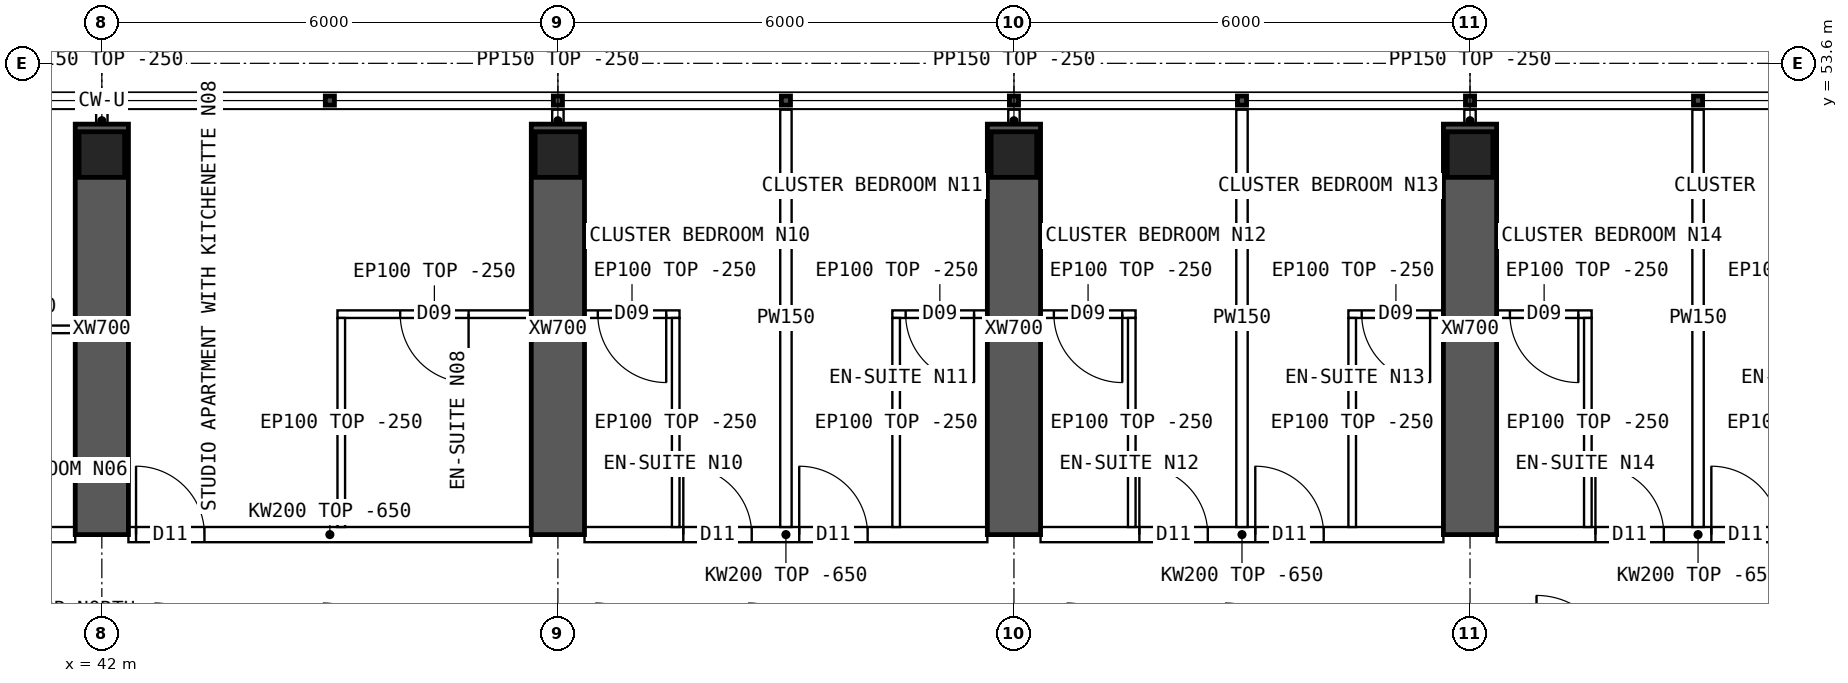
"""IFC4 building model, lengths in metres.
Left out: names, types, materials, properties, quantities, classifications, styles, units other than length and angle.
Written with IfcOpenShell. Run it as: python <this file> out.ifc"""

import sys

from ifc_helpers import new_model, si_unit, direction, frame, frame_2d, origin, origin_2d, place, context, subcontext, project, spatial, polyline, rectangle, hollow_rectangle, outline, extrude, element, fill, save


model = new_model("IFC4")
c1 = context("Model", 3, precision=1e-05, world=origin(), true_north=direction((0.0, 1.0)))
c2 = subcontext(c1, "Body", "Model", "MODEL_VIEW")
j1 = project(units=[si_unit("LENGTHUNIT", "METRE"), si_unit("PLANEANGLEUNIT", "RADIAN")], contexts=[c1])
p1 = place(None, origin())
s1 = spatial("IfcSite", under=j1, at=p1, CompositionType="ELEMENT")
p2 = place(p1, origin())
s2 = spatial("IfcBuilding", under=s1, at=p2, CompositionType="ELEMENT")
p3 = place(p2, frame((0.0, 0.0, 235.3)))
s3 = spatial("IfcBuildingStorey", under=s2, at=p3, CompositionType="ELEMENT", Elevation=235.3)
for number, where, z_axis, x_axis in (
    (1, (42.0, 52.4, 0.0), (0.0, 0.0, 1.0), (1.0, 0.0, 0.0)),
    (2, (48.0, 52.4, 0.0), (0.0, 0.0, 1.0), (1.0, 0.0, 0.0)),
    (3, (54.0, 52.4, 0.0), (0.0, 0.0, 1.0), (1.0, 0.0, 0.0)),
    (4, (60.0, 52.4, 0.0), (0.0, 0.0, 1.0), (1.0, 0.0, 0.0)),
):
    element("IfcColumn", number, at=place(p3, frame(where, z_axis=z_axis, x_axis=x_axis)), inside=s3, PredefinedType="COLUMN", context=c2, shape_type="SweptSolid", body=[
        extrude(hollow_rectangle(XDim=0.6, YDim=0.6, WallThickness=0.06, at=origin_2d()), origin(), (0.0, 0.0, 1.0), 3.75),
    ])
for number, where, z_axis, x_axis in (
    (5, (42.0, 47.4, 0.0), (0.0, 0.0, 1.0), (0.0, 1.0, 0.0)),
    (6, (48.0, 47.4, 0.0), (0.0, 0.0, 1.0), (0.0, 1.0, 0.0)),
    (7, (54.0, 47.4, 0.0), (0.0, 0.0, 1.0), (0.0, 1.0, 0.0)),
    (8, (60.0, 47.4, 0.0), (0.0, 0.0, 1.0), (0.0, 1.0, 0.0)),
):
    element("IfcWall", number, at=place(p3, frame(where, z_axis=z_axis, x_axis=x_axis)), inside=s3, PredefinedType="SHEAR", context=c2, shape_type="SweptSolid", body=[
        extrude(rectangle(XDim=5.4, YDim=0.7, at=frame_2d((2.7, 0.0))), origin(), (0.0, 0.0, 1.0), 3.75),
    ])
p4 = place(p3, frame((36.35, 47.4, 0.0), z_axis=(0.0, 0.0, 1.0), x_axis=(1.0, 0.0, 0.0)))
e9 = element("IfcWall", 9, at=p4, inside=s3, PredefinedType="SOLIDWALL", context=c2, shape_type="SweptSolid", body=[
    extrude(outline(polyline([(0.0, 0.0), (5.3, 0.0), (5.3, 3.1), (0.0, 3.1), (0.0, 0.0)])), frame((0.0, 0.1, 0.0), z_axis=(0.0, -1.0, 0.0), x_axis=(1.0, 0.0, 0.0)), (0.0, 0.0, 1.0), 0.2),
])
p5 = place(p4, frame((0.3, 0.0, 0.0)))
e10 = element("IfcOpeningElement", 10, at=p5, cuts=e9, PredefinedType="OPENING", context=c2, shape_type="SweptSolid", body=[
    extrude(rectangle(XDim=1.0, YDim=2.1, at=frame_2d((0.5, 1.05))), frame((0.0, 0.11, 0.0), z_axis=(0.0, -1.0, 0.0), x_axis=(1.0, 0.0, 0.0)), (0.0, 0.0, 1.0), 0.22),
])
p6 = place(p3, frame((42.35, 47.4, 0.0), z_axis=(0.0, 0.0, 1.0), x_axis=(1.0, 0.0, 0.0)))
e11 = element("IfcWall", 11, at=p6, inside=s3, PredefinedType="SOLIDWALL", context=c2, shape_type="SweptSolid", body=[
    extrude(outline(polyline([(0.0, 0.0), (5.3, 0.0), (5.3, 3.1), (0.0, 3.1), (0.0, 0.0)])), frame((0.0, 0.1, 0.0), z_axis=(0.0, -1.0, 0.0), x_axis=(1.0, 0.0, 0.0)), (0.0, 0.0, 1.0), 0.2),
])
p7 = place(p6, frame((0.1, 0.0, 0.0)))
e12 = element("IfcOpeningElement", 12, at=p7, cuts=e11, PredefinedType="OPENING", context=c2, shape_type="SweptSolid", body=[
    extrude(rectangle(XDim=0.9, YDim=2.1, at=frame_2d((0.45, 1.05))), frame((0.0, 0.11, 0.0), z_axis=(0.0, -1.0, 0.0), x_axis=(1.0, 0.0, 0.0)), (0.0, 0.0, 1.0), 0.22),
])
p8 = place(p3, frame((48.35, 47.4, 0.0), z_axis=(0.0, 0.0, 1.0), x_axis=(1.0, 0.0, 0.0)))
e13 = element("IfcWall", 13, at=p8, inside=s3, PredefinedType="SOLIDWALL", context=c2, shape_type="SweptSolid", body=[
    extrude(outline(polyline([(0.0, 0.0), (5.3, 0.0), (5.3, 3.1), (0.0, 3.1), (0.0, 0.0)])), frame((0.0, 0.1, 0.0), z_axis=(0.0, -1.0, 0.0), x_axis=(1.0, 0.0, 0.0)), (0.0, 0.0, 1.0), 0.2),
])
p9 = place(p8, frame((1.3, 0.0, 0.0)))
e14 = element("IfcOpeningElement", 14, at=p9, cuts=e13, PredefinedType="OPENING", context=c2, shape_type="SweptSolid", body=[
    extrude(rectangle(XDim=0.9, YDim=2.1, at=frame_2d((0.45, 1.05))), frame((0.0, 0.11, 0.0), z_axis=(0.0, -1.0, 0.0), x_axis=(1.0, 0.0, 0.0)), (0.0, 0.0, 1.0), 0.22),
])
p10 = place(p8, frame((2.825, 0.0, 0.0)))
e15 = element("IfcOpeningElement", 15, at=p10, cuts=e13, PredefinedType="OPENING", context=c2, shape_type="SweptSolid", body=[
    extrude(rectangle(XDim=0.9, YDim=2.1, at=frame_2d((0.45, 1.05))), frame((0.0, 0.11, 0.0), z_axis=(0.0, -1.0, 0.0), x_axis=(1.0, 0.0, 0.0)), (0.0, 0.0, 1.0), 0.22),
])
p11 = place(p3, frame((54.35, 47.4, 0.0), z_axis=(0.0, 0.0, 1.0), x_axis=(1.0, 0.0, 0.0)))
e16 = element("IfcWall", 16, at=p11, inside=s3, PredefinedType="SOLIDWALL", context=c2, shape_type="SweptSolid", body=[
    extrude(outline(polyline([(0.0, 0.0), (5.3, 0.0), (5.3, 3.1), (0.0, 3.1), (0.0, 0.0)])), frame((0.0, 0.1, 0.0), z_axis=(0.0, -1.0, 0.0), x_axis=(1.0, 0.0, 0.0)), (0.0, 0.0, 1.0), 0.2),
])
p12 = place(p11, frame((1.3, 0.0, 0.0)))
e17 = element("IfcOpeningElement", 17, at=p12, cuts=e16, PredefinedType="OPENING", context=c2, shape_type="SweptSolid", body=[
    extrude(rectangle(XDim=0.9, YDim=2.1, at=frame_2d((0.45, 1.05))), frame((0.0, 0.11, 0.0), z_axis=(0.0, -1.0, 0.0), x_axis=(1.0, 0.0, 0.0)), (0.0, 0.0, 1.0), 0.22),
])
p13 = place(p11, frame((2.825, 0.0, 0.0)))
e18 = element("IfcOpeningElement", 18, at=p13, cuts=e16, PredefinedType="OPENING", context=c2, shape_type="SweptSolid", body=[
    extrude(rectangle(XDim=0.9, YDim=2.1, at=frame_2d((0.45, 1.05))), frame((0.0, 0.11, 0.0), z_axis=(0.0, -1.0, 0.0), x_axis=(1.0, 0.0, 0.0)), (0.0, 0.0, 1.0), 0.22),
])
p14 = place(p3, frame((60.35, 47.4, 0.0), z_axis=(0.0, 0.0, 1.0), x_axis=(1.0, 0.0, 0.0)))
e19 = element("IfcWall", 19, at=p14, inside=s3, PredefinedType="SOLIDWALL", context=c2, shape_type="SweptSolid", body=[
    extrude(outline(polyline([(0.0, 0.0), (5.3, 0.0), (5.3, 3.1), (0.0, 3.1), (0.0, 0.0)])), frame((0.0, 0.1, 0.0), z_axis=(0.0, -1.0, 0.0), x_axis=(1.0, 0.0, 0.0)), (0.0, 0.0, 1.0), 0.2),
])
p15 = place(p14, frame((1.3, 0.0, 0.0)))
e20 = element("IfcOpeningElement", 20, at=p15, cuts=e19, PredefinedType="OPENING", context=c2, shape_type="SweptSolid", body=[
    extrude(rectangle(XDim=0.9, YDim=2.1, at=frame_2d((0.45, 1.05))), frame((0.0, 0.11, 0.0), z_axis=(0.0, -1.0, 0.0), x_axis=(1.0, 0.0, 0.0)), (0.0, 0.0, 1.0), 0.22),
])
p16 = place(p14, frame((2.825, 0.0, 0.0)))
e21 = element("IfcOpeningElement", 21, at=p16, cuts=e19, PredefinedType="OPENING", context=c2, shape_type="SweptSolid", body=[
    extrude(rectangle(XDim=0.9, YDim=2.1, at=frame_2d((0.45, 1.05))), frame((0.0, 0.11, 0.0), z_axis=(0.0, -1.0, 0.0), x_axis=(1.0, 0.0, 0.0)), (0.0, 0.0, 1.0), 0.22),
])
p17 = place(p3, frame((39.0, 50.1, 0.0), z_axis=(0.0, 0.0, 1.0), x_axis=(1.0, 0.0, 0.0)))
e22 = element("IfcWall", 22, at=p17, inside=s3, PredefinedType="PARTITIONING", context=c2, shape_type="SweptSolid", body=[
    extrude(rectangle(XDim=2.65, YDim=0.1, at=frame_2d((1.325, 0.0))), origin(), (0.0, 0.0, 1.0), 3.5),
])
p18 = place(p3, frame((45.1, 50.3, 0.0), z_axis=(0.0, 0.0, 1.0), x_axis=(1.0, 0.0, 0.0)))
e23 = element("IfcWall", 23, at=p18, inside=s3, PredefinedType="PARTITIONING", context=c2, shape_type="SweptSolid", body=[
    extrude(rectangle(XDim=2.55, YDim=0.1, at=frame_2d((1.275, 0.0))), origin(), (0.0, 0.0, 1.0), 3.5),
])
p19 = place(p18, frame((0.825, 0.0, 0.0)))
e24 = element("IfcOpeningElement", 24, at=p19, cuts=e23, PredefinedType="OPENING", context=c2, shape_type="SweptSolid", body=[
    extrude(rectangle(XDim=0.9, YDim=2.1, at=frame_2d((0.45, 1.05))), frame((0.0, 0.06, 0.0), z_axis=(0.0, -1.0, 0.0), x_axis=(1.0, 0.0, 0.0)), (0.0, 0.0, 1.0), 0.12),
])
p20 = place(p3, frame((45.15, 50.25, 0.0), z_axis=(0.0, 0.0, 1.0), x_axis=(0.0, -1.0, 0.0)))
e25 = element("IfcWall", 25, at=p20, inside=s3, PredefinedType="PARTITIONING", context=c2, shape_type="SweptSolid", body=[
    extrude(outline(polyline([(0.0, 0.0), (2.75, 0.0), (2.75, 3.1), (2.702, 3.1), (2.7, 3.5), (0.0, 3.5), (0.0, 0.0)])), frame((0.0, 0.05, 0.0), z_axis=(0.0, -1.0, 0.0), x_axis=(1.0, 0.0, 0.0)), (0.0, 0.0, 1.0), 0.1),
])
p21 = place(p3, frame((51.0, 52.99, 0.0), z_axis=(0.0, 0.0, 1.0), x_axis=(0.0, -1.0, 0.0)))
e26 = element("IfcWall", 26, at=p21, inside=s3, PredefinedType="PARTITIONING", context=c2, shape_type="SweptSolid", body=[
    extrude(outline(polyline([(0.0, 0.0), (5.49, 0.0), (5.49, 3.1), (5.442, 3.1), (5.44, 3.5), (0.792, 3.5), (0.79, 3.1), (0.392, 3.1), (0.39, 3.5), (0.0, 3.5), (0.0, 0.0)])), frame((0.0, 0.075, 0.0), z_axis=(0.0, -1.0, 0.0), x_axis=(1.0, 0.0, 0.0)), (0.0, 0.0, 1.0), 0.15),
])
p22 = place(p3, frame((48.35, 50.3, 0.0), z_axis=(0.0, 0.0, 1.0), x_axis=(1.0, 0.0, 0.0)))
e27 = element("IfcWall", 27, at=p22, inside=s3, PredefinedType="PARTITIONING", context=c2, shape_type="SweptSolid", body=[
    extrude(rectangle(XDim=1.25, YDim=0.1, at=frame_2d((0.625, 0.0))), origin(), (0.0, 0.0, 1.0), 3.5),
])
p23 = place(p22, frame((0.175, 0.0, 0.0)))
e28 = element("IfcOpeningElement", 28, at=p23, cuts=e27, PredefinedType="OPENING", context=c2, shape_type="SweptSolid", body=[
    extrude(rectangle(XDim=0.9, YDim=2.1, at=frame_2d((0.45, 1.05))), frame((0.0, 0.06, 0.0), z_axis=(0.0, -1.0, 0.0), x_axis=(1.0, 0.0, 0.0)), (0.0, 0.0, 1.0), 0.12),
])
p24 = place(p3, frame((49.55, 50.25, 0.0), z_axis=(0.0, 0.0, 1.0), x_axis=(0.0, -1.0, 0.0)))
e29 = element("IfcWall", 29, at=p24, inside=s3, PredefinedType="PARTITIONING", context=c2, shape_type="SweptSolid", body=[
    extrude(outline(polyline([(0.0, 0.0), (2.75, 0.0), (2.75, 3.1), (2.702, 3.1), (2.7, 3.5), (0.0, 3.5), (0.0, 0.0)])), frame((0.0, 0.05, 0.0), z_axis=(0.0, -1.0, 0.0), x_axis=(1.0, 0.0, 0.0)), (0.0, 0.0, 1.0), 0.1),
])
p25 = place(p3, frame((52.4, 50.3, 0.0), z_axis=(0.0, 0.0, 1.0), x_axis=(1.0, 0.0, 0.0)))
e30 = element("IfcWall", 30, at=p25, inside=s3, PredefinedType="PARTITIONING", context=c2, shape_type="SweptSolid", body=[
    extrude(rectangle(XDim=1.25, YDim=0.1, at=frame_2d((0.625, 0.0))), origin(), (0.0, 0.0, 1.0), 3.5),
])
p26 = place(p25, frame((0.175, 0.0, 0.0)))
e31 = element("IfcOpeningElement", 31, at=p26, cuts=e30, PredefinedType="OPENING", context=c2, shape_type="SweptSolid", body=[
    extrude(rectangle(XDim=0.9, YDim=2.1, at=frame_2d((0.45, 1.05))), frame((0.0, 0.06, 0.0), z_axis=(0.0, -1.0, 0.0), x_axis=(1.0, 0.0, 0.0)), (0.0, 0.0, 1.0), 0.12),
])
p27 = place(p3, frame((52.45, 50.25, 0.0), z_axis=(0.0, 0.0, 1.0), x_axis=(0.0, -1.0, 0.0)))
e32 = element("IfcWall", 32, at=p27, inside=s3, PredefinedType="PARTITIONING", context=c2, shape_type="SweptSolid", body=[
    extrude(outline(polyline([(0.0, 0.0), (2.75, 0.0), (2.75, 3.1), (2.702, 3.1), (2.7, 3.5), (0.0, 3.5), (0.0, 0.0)])), frame((0.0, 0.05, 0.0), z_axis=(0.0, -1.0, 0.0), x_axis=(1.0, 0.0, 0.0)), (0.0, 0.0, 1.0), 0.1),
])
p28 = place(p3, frame((57.0, 52.99, 0.0), z_axis=(0.0, 0.0, 1.0), x_axis=(0.0, -1.0, 0.0)))
e33 = element("IfcWall", 33, at=p28, inside=s3, PredefinedType="PARTITIONING", context=c2, shape_type="SweptSolid", body=[
    extrude(outline(polyline([(0.0, 0.0), (5.49, 0.0), (5.49, 3.1), (5.442, 3.1), (5.44, 3.5), (0.792, 3.5), (0.79, 3.1), (0.392, 3.1), (0.39, 3.5), (0.0, 3.5), (0.0, 0.0)])), frame((0.0, 0.075, 0.0), z_axis=(0.0, -1.0, 0.0), x_axis=(1.0, 0.0, 0.0)), (0.0, 0.0, 1.0), 0.15),
])
p29 = place(p3, frame((54.35, 50.3, 0.0), z_axis=(0.0, 0.0, 1.0), x_axis=(1.0, 0.0, 0.0)))
e34 = element("IfcWall", 34, at=p29, inside=s3, PredefinedType="PARTITIONING", context=c2, shape_type="SweptSolid", body=[
    extrude(rectangle(XDim=1.25, YDim=0.1, at=frame_2d((0.625, 0.0))), origin(), (0.0, 0.0, 1.0), 3.5),
])
p30 = place(p29, frame((0.175, 0.0, 0.0)))
e35 = element("IfcOpeningElement", 35, at=p30, cuts=e34, PredefinedType="OPENING", context=c2, shape_type="SweptSolid", body=[
    extrude(rectangle(XDim=0.9, YDim=2.1, at=frame_2d((0.45, 1.05))), frame((0.0, 0.06, 0.0), z_axis=(0.0, -1.0, 0.0), x_axis=(1.0, 0.0, 0.0)), (0.0, 0.0, 1.0), 0.12),
])
p31 = place(p3, frame((55.55, 50.25, 0.0), z_axis=(0.0, 0.0, 1.0), x_axis=(0.0, -1.0, 0.0)))
e36 = element("IfcWall", 36, at=p31, inside=s3, PredefinedType="PARTITIONING", context=c2, shape_type="SweptSolid", body=[
    extrude(outline(polyline([(0.0, 0.0), (2.75, 0.0), (2.75, 3.1), (2.702, 3.1), (2.7, 3.5), (0.0, 3.5), (0.0, 0.0)])), frame((0.0, 0.05, 0.0), z_axis=(0.0, -1.0, 0.0), x_axis=(1.0, 0.0, 0.0)), (0.0, 0.0, 1.0), 0.1),
])
p32 = place(p3, frame((58.4, 50.3, 0.0), z_axis=(0.0, 0.0, 1.0), x_axis=(1.0, 0.0, 0.0)))
e37 = element("IfcWall", 37, at=p32, inside=s3, PredefinedType="PARTITIONING", context=c2, shape_type="SweptSolid", body=[
    extrude(rectangle(XDim=1.25, YDim=0.1, at=frame_2d((0.625, 0.0))), origin(), (0.0, 0.0, 1.0), 3.5),
])
p33 = place(p32, frame((0.175, 0.0, 0.0)))
e38 = element("IfcOpeningElement", 38, at=p33, cuts=e37, PredefinedType="OPENING", context=c2, shape_type="SweptSolid", body=[
    extrude(rectangle(XDim=0.9, YDim=2.1, at=frame_2d((0.45, 1.05))), frame((0.0, 0.06, 0.0), z_axis=(0.0, -1.0, 0.0), x_axis=(1.0, 0.0, 0.0)), (0.0, 0.0, 1.0), 0.12),
])
p34 = place(p3, frame((58.45, 50.25, 0.0), z_axis=(0.0, 0.0, 1.0), x_axis=(0.0, -1.0, 0.0)))
e39 = element("IfcWall", 39, at=p34, inside=s3, PredefinedType="PARTITIONING", context=c2, shape_type="SweptSolid", body=[
    extrude(outline(polyline([(0.0, 0.0), (2.75, 0.0), (2.75, 3.1), (2.702, 3.1), (2.7, 3.5), (0.0, 3.5), (0.0, 0.0)])), frame((0.0, 0.05, 0.0), z_axis=(0.0, -1.0, 0.0), x_axis=(1.0, 0.0, 0.0)), (0.0, 0.0, 1.0), 0.1),
])
p35 = place(p3, frame((63.0, 52.99, 0.0), z_axis=(0.0, 0.0, 1.0), x_axis=(0.0, -1.0, 0.0)))
e40 = element("IfcWall", 40, at=p35, inside=s3, PredefinedType="PARTITIONING", context=c2, shape_type="SweptSolid", body=[
    extrude(outline(polyline([(0.0, 0.0), (5.49, 0.0), (5.49, 3.1), (5.442, 3.1), (5.44, 3.5), (0.792, 3.5), (0.79, 3.1), (0.392, 3.1), (0.39, 3.5), (0.0, 3.5), (0.0, 0.0)])), frame((0.0, 0.075, 0.0), z_axis=(0.0, -1.0, 0.0), x_axis=(1.0, 0.0, 0.0)), (0.0, 0.0, 1.0), 0.15),
])
p36 = place(p3, frame((60.35, 50.3, 0.0), z_axis=(0.0, 0.0, 1.0), x_axis=(1.0, 0.0, 0.0)))
e41 = element("IfcWall", 41, at=p36, inside=s3, PredefinedType="PARTITIONING", context=c2, shape_type="SweptSolid", body=[
    extrude(rectangle(XDim=1.25, YDim=0.1, at=frame_2d((0.625, 0.0))), origin(), (0.0, 0.0, 1.0), 3.5),
])
p37 = place(p36, frame((0.175, 0.0, 0.0)))
e42 = element("IfcOpeningElement", 42, at=p37, cuts=e41, PredefinedType="OPENING", context=c2, shape_type="SweptSolid", body=[
    extrude(rectangle(XDim=0.9, YDim=2.1, at=frame_2d((0.45, 1.05))), frame((0.0, 0.06, 0.0), z_axis=(0.0, -1.0, 0.0), x_axis=(1.0, 0.0, 0.0)), (0.0, 0.0, 1.0), 0.12),
])
p38 = place(p3, frame((61.55, 50.25, 0.0), z_axis=(0.0, 0.0, 1.0), x_axis=(0.0, -1.0, 0.0)))
e43 = element("IfcWall", 43, at=p38, inside=s3, PredefinedType="PARTITIONING", context=c2, shape_type="SweptSolid", body=[
    extrude(outline(polyline([(0.0, 0.0), (2.75, 0.0), (2.75, 3.1), (2.702, 3.1), (2.7, 3.5), (0.0, 3.5), (0.0, 0.0)])), frame((0.0, 0.05, 0.0), z_axis=(0.0, -1.0, 0.0), x_axis=(1.0, 0.0, 0.0)), (0.0, 0.0, 1.0), 0.1),
])
for number, where, z_axis, x_axis in (
    (44, (42.0, 52.7, 0.0), (0.0, 0.0, 1.0), (0.0, 1.0, 0.0)),
    (45, (48.0, 52.7, 0.0), (0.0, 0.0, 1.0), (0.0, 1.0, 0.0)),
    (46, (54.0, 52.7, 0.0), (0.0, 0.0, 1.0), (0.0, 1.0, 0.0)),
    (47, (60.0, 52.7, 0.0), (0.0, 0.0, 1.0), (0.0, 1.0, 0.0)),
):
    element("IfcWall", number, at=place(p3, frame(where, z_axis=z_axis, x_axis=x_axis)), inside=s3, PredefinedType="PARTITIONING", context=c2, shape_type="SweptSolid", body=[
        extrude(rectangle(XDim=0.29, YDim=0.15, at=frame_2d((0.145, 0.0))), origin(), (0.0, 0.0, 1.0), 3.5),
    ])
p39 = place(p19, origin())
e48 = element("IfcDoor", 48, at=p39, inside=s3, OperationType="SINGLE_SWING_RIGHT", PredefinedType="DOOR", context=c2, shape_type="SweptSolid", body=[
    extrude(rectangle(XDim=0.9, YDim=2.1, at=frame_2d((0.45, 1.05))), frame((0.0, 0.025, 0.0), z_axis=(0.0, -1.0, 0.0), x_axis=(1.0, 0.0, 0.0)), (0.0, 0.0, 1.0), 0.05),
])
fill(e24, e48)
p40 = place(p7, origin())
e49 = element("IfcDoor", 49, at=p40, inside=s3, OperationType="SINGLE_SWING_LEFT", PredefinedType="DOOR", context=c2, shape_type="SweptSolid", body=[
    extrude(rectangle(XDim=0.9, YDim=2.1, at=frame_2d((0.45, 1.05))), frame((0.0, 0.025, 0.0), z_axis=(0.0, -1.0, 0.0), x_axis=(1.0, 0.0, 0.0)), (0.0, 0.0, 1.0), 0.05),
])
fill(e12, e49)
p41 = place(p23, origin())
e50 = element("IfcDoor", 50, at=p41, inside=s3, OperationType="SINGLE_SWING_RIGHT", PredefinedType="DOOR", context=c2, shape_type="SweptSolid", body=[
    extrude(rectangle(XDim=0.9, YDim=2.1, at=frame_2d((0.45, 1.05))), frame((0.0, 0.025, 0.0), z_axis=(0.0, -1.0, 0.0), x_axis=(1.0, 0.0, 0.0)), (0.0, 0.0, 1.0), 0.05),
])
fill(e28, e50)
p42 = place(p9, origin())
e51 = element("IfcDoor", 51, at=p42, inside=s3, OperationType="SINGLE_SWING_LEFT", PredefinedType="DOOR", context=c2, shape_type="SweptSolid", body=[
    extrude(rectangle(XDim=0.9, YDim=2.1, at=frame_2d((0.45, 1.05))), frame((0.0, 0.025, 0.0), z_axis=(0.0, -1.0, 0.0), x_axis=(1.0, 0.0, 0.0)), (0.0, 0.0, 1.0), 0.05),
])
fill(e14, e51)
p43 = place(p26, origin())
e52 = element("IfcDoor", 52, at=p43, inside=s3, OperationType="SINGLE_SWING_RIGHT", PredefinedType="DOOR", context=c2, shape_type="SweptSolid", body=[
    extrude(rectangle(XDim=0.9, YDim=2.1, at=frame_2d((0.45, 1.05))), frame((0.0, 0.025, 0.0), z_axis=(0.0, -1.0, 0.0), x_axis=(1.0, 0.0, 0.0)), (0.0, 0.0, 1.0), 0.05),
])
fill(e31, e52)
p44 = place(p10, origin())
e53 = element("IfcDoor", 53, at=p44, inside=s3, OperationType="SINGLE_SWING_LEFT", PredefinedType="DOOR", context=c2, shape_type="SweptSolid", body=[
    extrude(rectangle(XDim=0.9, YDim=2.1, at=frame_2d((0.45, 1.05))), frame((0.0, 0.025, 0.0), z_axis=(0.0, -1.0, 0.0), x_axis=(1.0, 0.0, 0.0)), (0.0, 0.0, 1.0), 0.05),
])
fill(e15, e53)
p45 = place(p30, origin())
e54 = element("IfcDoor", 54, at=p45, inside=s3, OperationType="SINGLE_SWING_RIGHT", PredefinedType="DOOR", context=c2, shape_type="SweptSolid", body=[
    extrude(rectangle(XDim=0.9, YDim=2.1, at=frame_2d((0.45, 1.05))), frame((0.0, 0.025, 0.0), z_axis=(0.0, -1.0, 0.0), x_axis=(1.0, 0.0, 0.0)), (0.0, 0.0, 1.0), 0.05),
])
fill(e35, e54)
p46 = place(p12, origin())
e55 = element("IfcDoor", 55, at=p46, inside=s3, OperationType="SINGLE_SWING_LEFT", PredefinedType="DOOR", context=c2, shape_type="SweptSolid", body=[
    extrude(rectangle(XDim=0.9, YDim=2.1, at=frame_2d((0.45, 1.05))), frame((0.0, 0.025, 0.0), z_axis=(0.0, -1.0, 0.0), x_axis=(1.0, 0.0, 0.0)), (0.0, 0.0, 1.0), 0.05),
])
fill(e17, e55)
p47 = place(p33, origin())
e56 = element("IfcDoor", 56, at=p47, inside=s3, OperationType="SINGLE_SWING_RIGHT", PredefinedType="DOOR", context=c2, shape_type="SweptSolid", body=[
    extrude(rectangle(XDim=0.9, YDim=2.1, at=frame_2d((0.45, 1.05))), frame((0.0, 0.025, 0.0), z_axis=(0.0, -1.0, 0.0), x_axis=(1.0, 0.0, 0.0)), (0.0, 0.0, 1.0), 0.05),
])
fill(e38, e56)
p48 = place(p13, origin())
e57 = element("IfcDoor", 57, at=p48, inside=s3, OperationType="SINGLE_SWING_LEFT", PredefinedType="DOOR", context=c2, shape_type="SweptSolid", body=[
    extrude(rectangle(XDim=0.9, YDim=2.1, at=frame_2d((0.45, 1.05))), frame((0.0, 0.025, 0.0), z_axis=(0.0, -1.0, 0.0), x_axis=(1.0, 0.0, 0.0)), (0.0, 0.0, 1.0), 0.05),
])
fill(e18, e57)
p49 = place(p37, origin())
e58 = element("IfcDoor", 58, at=p49, inside=s3, OperationType="SINGLE_SWING_RIGHT", PredefinedType="DOOR", context=c2, shape_type="SweptSolid", body=[
    extrude(rectangle(XDim=0.9, YDim=2.1, at=frame_2d((0.45, 1.05))), frame((0.0, 0.025, 0.0), z_axis=(0.0, -1.0, 0.0), x_axis=(1.0, 0.0, 0.0)), (0.0, 0.0, 1.0), 0.05),
])
fill(e42, e58)
p50 = place(p15, origin())
e59 = element("IfcDoor", 59, at=p50, inside=s3, OperationType="SINGLE_SWING_LEFT", PredefinedType="DOOR", context=c2, shape_type="SweptSolid", body=[
    extrude(rectangle(XDim=0.9, YDim=2.1, at=frame_2d((0.45, 1.05))), frame((0.0, 0.025, 0.0), z_axis=(0.0, -1.0, 0.0), x_axis=(1.0, 0.0, 0.0)), (0.0, 0.0, 1.0), 0.05),
])
fill(e20, e59)
p51 = place(p16, origin())
e60 = element("IfcDoor", 60, at=p51, inside=s3, OperationType="SINGLE_SWING_LEFT", PredefinedType="DOOR", context=c2, shape_type="SweptSolid", body=[
    extrude(rectangle(XDim=0.9, YDim=2.1, at=frame_2d((0.45, 1.05))), frame((0.0, 0.025, 0.0), z_axis=(0.0, -1.0, 0.0), x_axis=(1.0, 0.0, 0.0)), (0.0, 0.0, 1.0), 0.05),
])
fill(e21, e60)
save(model, sys.argv[1])
